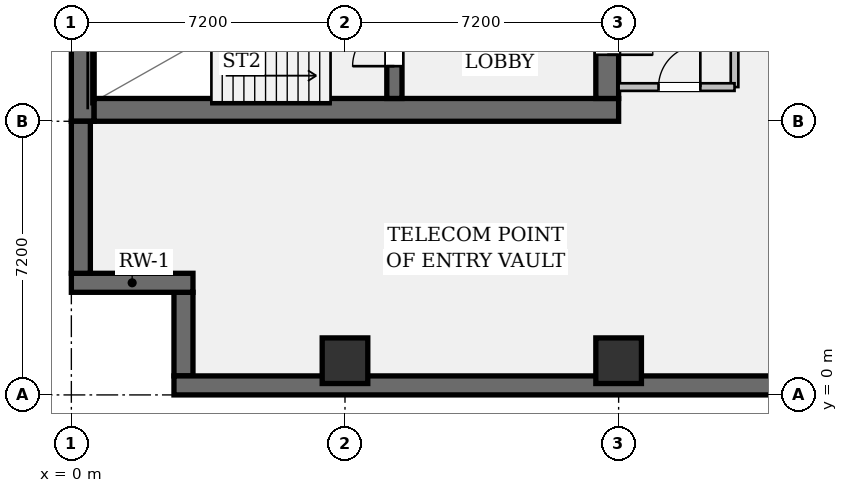
"""IFC4 building model, lengths in metres.
Left out: names, types, materials, properties, quantities, classifications, styles, units other than length and angle.
Written with IfcOpenShell. Run it as: python <this file> out.ifc"""

import sys

from ifc_helpers import new_model, si_unit, direction, frame, frame_2d, origin, origin_2d, place, context, subcontext, project, spatial, rectangle, hollow_rectangle, extrude, element, fill, save


model = new_model("IFC4")
c1 = context("Model", 3, precision=1e-05, world=origin(), true_north=direction((0.0, 1.0)))
c2 = subcontext(c1, "Body", "Model", "MODEL_VIEW")
j1 = project(units=[si_unit("LENGTHUNIT", "METRE"), si_unit("PLANEANGLEUNIT", "RADIAN")], contexts=[c1])
p1 = place(None, origin())
s1 = spatial("IfcSite", under=j1, at=p1, CompositionType="ELEMENT")
p2 = place(p1, origin())
s2 = spatial("IfcBuilding", under=s1, at=p2, CompositionType="ELEMENT")
p3 = place(p2, frame((0.0, 0.0, -4.55)))
s3 = spatial("IfcBuildingStorey", under=s2, at=p3, CompositionType="ELEMENT", Elevation=-4.55)
p4 = place(p3, frame((0.3, 7.2, 0.0), z_axis=(0.0, 0.0, 1.0), x_axis=(0.0, 1.0, 0.0)))
e1 = element("IfcWall", 1, at=p4, inside=s3, PredefinedType="SHEAR", context=c2, shape_type="SweptSolid", body=[
    extrude(rectangle(XDim=28.8, YDim=0.6, at=frame_2d((14.4, 0.0))), origin(), (0.0, 0.0, 1.0), 4.25),
])
p5 = place(p3, frame((0.6, 7.5, 0.0), z_axis=(0.0, 0.0, 1.0), x_axis=(1.0, 0.0, 0.0)))
e2 = element("IfcWall", 2, at=p5, inside=s3, PredefinedType="SHEAR", context=c2, shape_type="SweptSolid", body=[
    extrude(rectangle(XDim=13.8, YDim=0.6, at=frame_2d((6.9, 0.0))), origin(), (0.0, 0.0, 1.0), 4.25),
])
p6 = place(p3, frame((14.1, 35.4, 0.0), z_axis=(0.0, 0.0, 1.0), x_axis=(0.0, -1.0, 0.0)))
e3 = element("IfcWall", 3, at=p6, inside=s3, PredefinedType="SHEAR", context=c2, shape_type="SweptSolid", body=[
    extrude(rectangle(XDim=27.6, YDim=0.6, at=frame_2d((13.8, 0.0))), origin(), (0.0, 0.0, 1.0), 4.25),
])
p7 = place(p6, frame((1.3, 0.0, 0.0)))
e4 = element("IfcOpeningElement", 4, at=p7, cuts=e3, PredefinedType="OPENING", context=c2, shape_type="SweptSolid", body=[
    extrude(rectangle(XDim=1.2, YDim=2.15, at=frame_2d((0.6, 1.075))), frame((0.0, 0.312, 0.0), z_axis=(0.0, -1.0, 0.0), x_axis=(1.0, 0.0, 0.0)), (0.0, 0.0, 1.0), 0.624),
])
p8 = place(p6, frame((25.25, 0.0, 0.0)))
e5 = element("IfcOpeningElement", 5, at=p8, cuts=e3, PredefinedType="OPENING", context=c2, shape_type="SweptSolid", body=[
    extrude(rectangle(XDim=1.2, YDim=2.15, at=frame_2d((0.6, 1.075))), frame((0.0, 0.312, 0.0), z_axis=(0.0, -1.0, 0.0), x_axis=(1.0, 0.0, 0.0)), (0.0, 0.0, 1.0), 0.624),
])
p9 = place(p6, frame((14.6, 0.0, 0.0)))
e6 = element("IfcOpeningElement", 6, at=p9, cuts=e3, PredefinedType="OPENING", context=c2, shape_type="SweptSolid", body=[
    extrude(rectangle(XDim=1.6, YDim=2.2, at=frame_2d((0.8, 1.1))), frame((0.0, 0.312, 0.0), z_axis=(0.0, -1.0, 0.0), x_axis=(1.0, 0.0, 0.0)), (0.0, 0.0, 1.0), 0.624),
])
p10 = place(p3, frame((8.5, 7.8, 0.0), z_axis=(0.0, 0.0, 1.0), x_axis=(0.0, 1.0, 0.0)))
e7 = element("IfcWall", 7, at=p10, inside=s3, PredefinedType="SHEAR", context=c2, shape_type="SweptSolid", body=[
    extrude(rectangle(XDim=3.68, YDim=0.4, at=frame_2d((1.84, 0.0))), origin(), (0.0, 0.0, 1.0), 4.25),
])
p11 = place(p10, frame((0.85, 0.0, 0.0)))
e8 = element("IfcOpeningElement", 8, at=p11, cuts=e7, PredefinedType="OPENING", context=c2, shape_type="SweptSolid", body=[
    extrude(rectangle(XDim=1.1, YDim=2.15, at=frame_2d((0.55, 1.075))), frame((0.0, 0.212, 0.0), z_axis=(0.0, -1.0, 0.0), x_axis=(1.0, 0.0, 0.0)), (0.0, 0.0, 1.0), 0.424),
])
p12 = place(p3, frame((2.95, 0.5, 0.0), z_axis=(0.0, 0.0, 1.0), x_axis=(0.0, 1.0, 0.0)))
e9 = element("IfcWall", 9, at=p12, inside=s3, PredefinedType="SOLIDWALL", context=c2, shape_type="SweptSolid", body=[
    extrude(rectangle(XDim=2.2, YDim=0.5, at=frame_2d((1.1, 0.0))), origin(), (0.0, 0.0, 1.0), 4.25),
])
p13 = place(p3, frame((3.2, 2.95, 0.0), z_axis=(0.0, 0.0, 1.0), x_axis=(-1.0, 0.0, 0.0)))
e10 = element("IfcWall", 10, at=p13, inside=s3, PredefinedType="SOLIDWALL", context=c2, shape_type="SweptSolid", body=[
    extrude(rectangle(XDim=3.2, YDim=0.5, at=frame_2d((1.6, 0.0))), origin(), (0.0, 0.0, 1.0), 4.25),
])
p14 = place(p3, frame((0.25, 3.2, 0.0), z_axis=(0.0, 0.0, 1.0), x_axis=(0.0, 1.0, 0.0)))
e11 = element("IfcWall", 11, at=p14, inside=s3, PredefinedType="SOLIDWALL", context=c2, shape_type="SweptSolid", body=[
    extrude(rectangle(XDim=4.0, YDim=0.5, at=frame_2d((2.0, 0.0))), origin(), (0.0, 0.0, 1.0), 4.25),
])
p15 = place(p3, frame((83.7, 0.25, 0.0), z_axis=(0.0, 0.0, 1.0), x_axis=(-1.0, 0.0, 0.0)))
e12 = element("IfcWall", 12, at=p15, inside=s3, PredefinedType="SOLIDWALL", context=c2, shape_type="SweptSolid", body=[
    extrude(rectangle(XDim=81.0, YDim=0.5, at=frame_2d((40.5, 0.0))), origin(), (0.0, 0.0, 1.0), 4.25),
])
for number, where, z_axis, x_axis in (
    (13, (7.2, 0.9, 0.0), (0.0, 0.0, 1.0), (1.0, 0.0, 0.0)),
    (14, (14.4, 0.9, 0.0), (0.0, 0.0, 1.0), (1.0, 0.0, 0.0)),
):
    element("IfcColumn", number, at=place(p3, frame(where, z_axis=z_axis, x_axis=x_axis)), inside=s3, PredefinedType="COLUMN", context=c2, shape_type="SweptSolid", body=[
        extrude(hollow_rectangle(XDim=1.2, YDim=1.2, WallThickness=0.075, at=origin_2d()), origin(), (0.0, 0.0, 1.0), 4.25),
    ])
p16 = place(p3, frame((17.45, 8.1, 0.0), z_axis=(0.0, 0.0, 1.0), x_axis=(0.0, 1.0, 0.0)))
e15 = element("IfcWall", 15, at=p16, inside=s3, PredefinedType="PARTITIONING", context=c2, shape_type="SweptSolid", body=[
    extrude(rectangle(XDim=31.0, YDim=0.2, at=frame_2d((15.5, 0.0))), origin(), (0.0, 0.0, 1.0), 3.288),
])
p17 = place(p16, frame((9.8, 0.0, 0.0)))
e16 = element("IfcOpeningElement", 16, at=p17, cuts=e15, PredefinedType="OPENING", context=c2, shape_type="SweptSolid", body=[
    extrude(rectangle(XDim=1.2, YDim=2.15, at=frame_2d((0.6, 1.075))), frame((0.0, 0.112, 0.0), z_axis=(0.0, -1.0, 0.0), x_axis=(1.0, 0.0, 0.0)), (0.0, 0.0, 1.0), 0.224),
])
p18 = place(p16, frame((23.6, 0.0, 0.0)))
e17 = element("IfcOpeningElement", 17, at=p18, cuts=e15, PredefinedType="OPENING", context=c2, shape_type="SweptSolid", body=[
    extrude(rectangle(XDim=1.2, YDim=2.15, at=frame_2d((0.6, 1.075))), frame((0.0, 0.112, 0.0), z_axis=(0.0, -1.0, 0.0), x_axis=(1.0, 0.0, 0.0)), (0.0, 0.0, 1.0), 0.224),
])
p19 = place(p3, frame((14.4, 8.1, 0.0), z_axis=(0.0, 0.0, 1.0), x_axis=(1.0, 0.0, 0.0)))
e18 = element("IfcWall", 18, at=p19, inside=s3, PredefinedType="PARTITIONING", context=c2, shape_type="SweptSolid", body=[
    extrude(rectangle(XDim=3.05, YDim=0.2, at=frame_2d((1.525, 0.0))), origin(), (0.0, 0.0, 1.0), 3.288),
])
p20 = place(p19, frame((1.05, 0.0, 0.0)))
e19 = element("IfcOpeningElement", 19, at=p20, cuts=e18, PredefinedType="OPENING", context=c2, shape_type="SweptSolid", body=[
    extrude(rectangle(XDim=1.1, YDim=2.15, at=frame_2d((0.55, 1.075))), frame((0.0, 0.112, 0.0), z_axis=(0.0, -1.0, 0.0), x_axis=(1.0, 0.0, 0.0)), (0.0, 0.0, 1.0), 0.224),
])
p21 = place(p11, origin())
e20 = element("IfcDoor", 20, at=p21, inside=s3, OperationType="SINGLE_SWING_LEFT", PredefinedType="DOOR", context=c2, shape_type="SweptSolid", body=[
    extrude(rectangle(XDim=1.1, YDim=2.15, at=frame_2d((0.55, 1.075))), frame((0.0, 0.025, 0.0), z_axis=(0.0, -1.0, 0.0), x_axis=(1.0, 0.0, 0.0)), (0.0, 0.0, 1.0), 0.05),
])
fill(e8, e20)
p22 = place(p8, origin())
e21 = element("IfcDoor", 21, at=p22, inside=s3, OperationType="SINGLE_SWING_RIGHT", PredefinedType="DOOR", context=c2, shape_type="SweptSolid", body=[
    extrude(rectangle(XDim=1.2, YDim=2.15, at=frame_2d((0.6, 1.075))), frame((0.0, 0.025, 0.0), z_axis=(0.0, -1.0, 0.0), x_axis=(1.0, 0.0, 0.0)), (0.0, 0.0, 1.0), 0.05),
])
fill(e5, e21)
p23 = place(p20, origin())
e22 = element("IfcDoor", 22, at=p23, inside=s3, OperationType="SINGLE_SWING_RIGHT", PredefinedType="DOOR", context=c2, shape_type="SweptSolid", body=[
    extrude(rectangle(XDim=1.1, YDim=2.15, at=frame_2d((0.55, 1.075))), frame((0.0, 0.025, 0.0), z_axis=(0.0, -1.0, 0.0), x_axis=(1.0, 0.0, 0.0)), (0.0, 0.0, 1.0), 0.05),
])
fill(e19, e22)
save(model, sys.argv[1])
